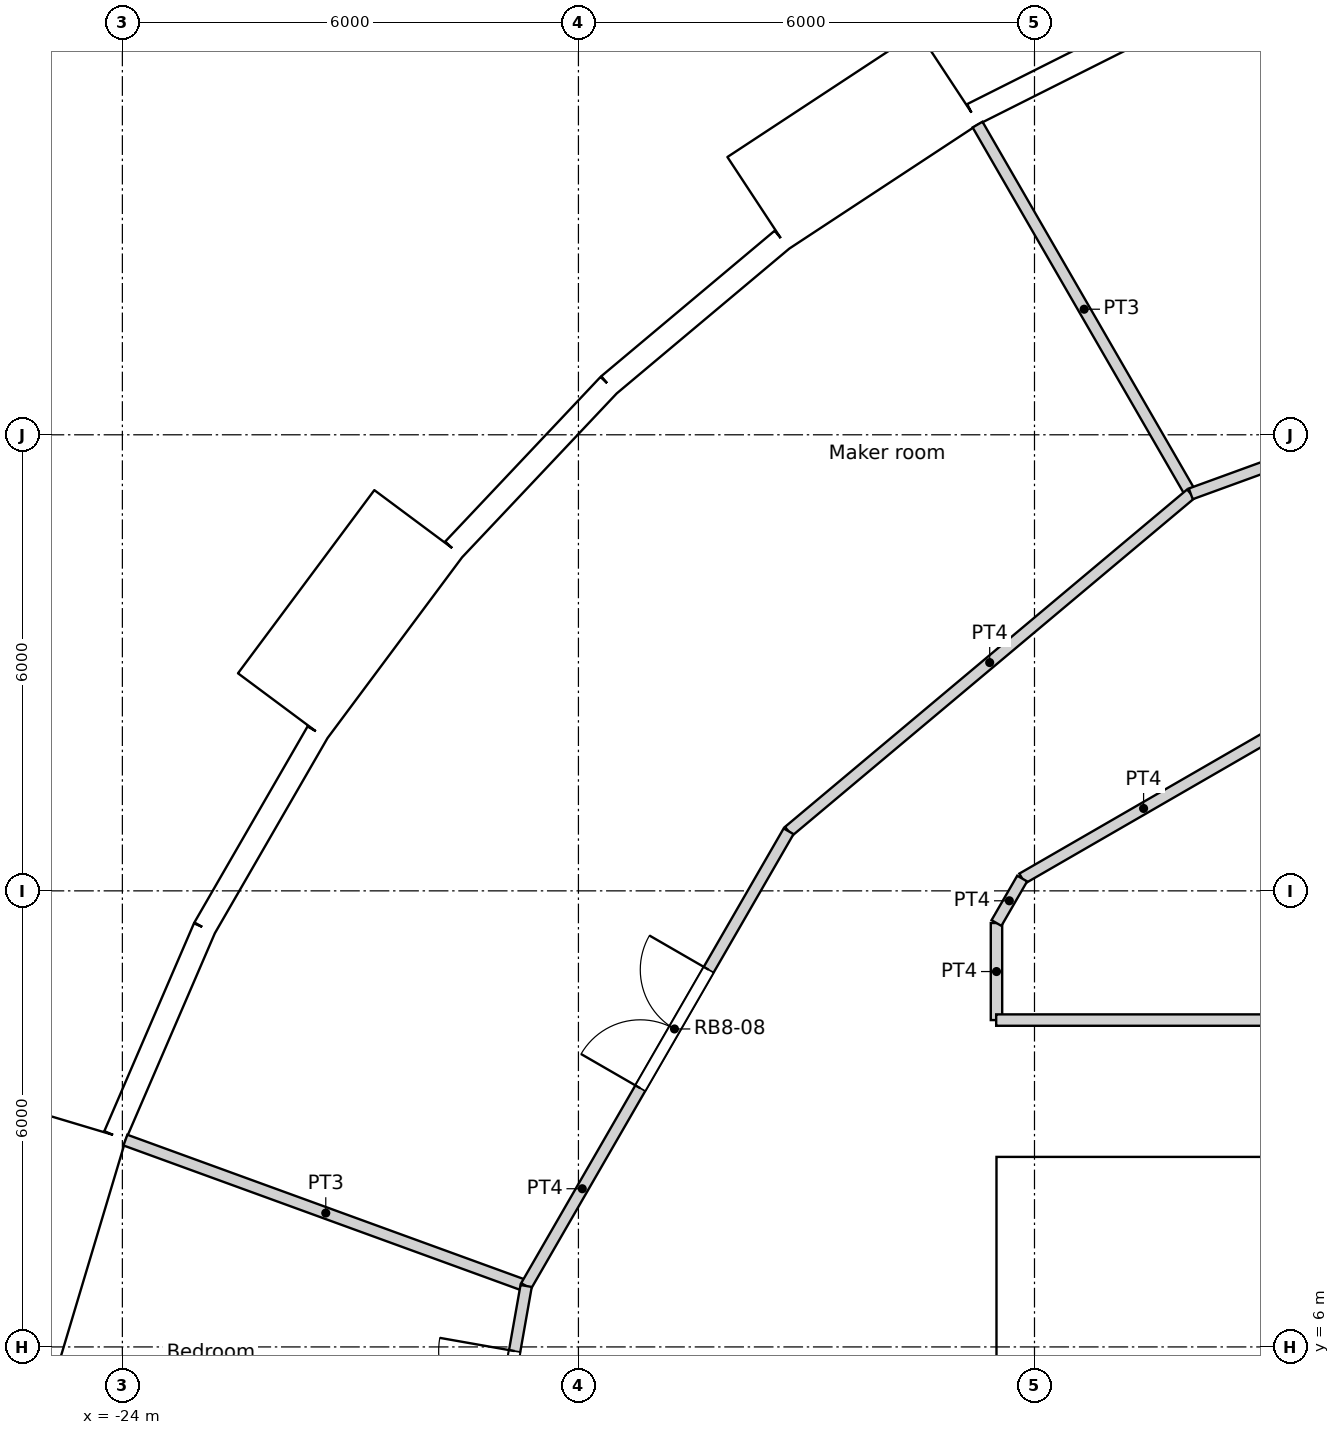
"""IFC4 building model, lengths in metres.
Left out: names, types, materials, properties, quantities, classifications, styles, units other than length and angle.
Written with IfcOpenShell. Run it as: python <this file> out.ifc"""

import sys

from ifc_helpers import new_model, si_unit, direction, frame, frame_2d, origin, origin_2d, place, context, subcontext, project, spatial, rectangle, circle, extrude, element, fill, save


model = new_model("IFC4")
c1 = context("Model", 3, precision=1e-05, world=origin(), true_north=direction((0.0, 1.0)))
c2 = subcontext(c1, "Body", "Model", "MODEL_VIEW")
j1 = project(units=[si_unit("LENGTHUNIT", "METRE"), si_unit("PLANEANGLEUNIT", "RADIAN")], contexts=[c1])
p1 = place(None, origin())
s1 = spatial("IfcSite", under=j1, at=p1, CompositionType="ELEMENT")
p2 = place(p1, origin())
s2 = spatial("IfcBuilding", under=s1, at=p2, CompositionType="ELEMENT")
p3 = place(p2, frame((0.0, 0.0, 201.6)))
s3 = spatial("IfcBuildingStorey", under=s2, at=p3, CompositionType="ELEMENT", Elevation=201.6)
for number, where, z_axis, x_axis in (
    (1, (-12.274, 21.259, 0.0), (0.0, 0.0, 1.0), (1.0, 0.0, 0.0)),
    (2, (-16.846, 17.855, 0.0), (0.0, 0.0, 1.0), (1.0, 0.0, 0.0)),
    (3, (-20.509, 13.489, 0.0), (0.0, 0.0, 1.0), (1.0, 0.0, 0.0)),
    (4, (-23.067, 8.396, 0.0), (0.0, 0.0, 1.0), (1.0, 0.0, 0.0)),
):
    element("IfcColumn", number, at=place(p3, frame(where, z_axis=z_axis, x_axis=x_axis)), inside=s3, PredefinedType="COLUMN", context=c2, shape_type="SweptSolid", body=[
        extrude(circle(Radius=0.6, at=origin_2d()), origin(), (0.0, 0.0, 1.0), 3.6),
    ])
for number, where, z_axis, x_axis in (
    (5, (-9.411, 16.301, 0.0), (0.0, 0.0, 1.0), (1.0, 0.0, 0.0)),
    (6, (-13.798, 12.802, 0.0), (0.0, 0.0, 1.0), (1.0, 0.0, 0.0)),
    (7, (-16.958, 8.167, 0.0), (0.0, 0.0, 1.0), (1.0, 0.0, 0.0)),
):
    element("IfcColumn", number, at=place(p3, frame(where, z_axis=z_axis, x_axis=x_axis)), inside=s3, PredefinedType="COLUMN", context=c2, shape_type="SweptSolid", body=[
        extrude(circle(Radius=0.65, at=origin_2d()), origin(), (0.0, 0.0, 1.0), 3.6),
    ])
p4 = place(p3, frame((-10.158, 23.55, 0.0), z_axis=(0.0, 0.0, 1.0), x_axis=(-0.893637442555, -0.448789618045, 0.0)))
e8 = element("IfcWall", 8, at=p4, inside=s3, PredefinedType="SOLIDWALL", context=c2, shape_type="SweptSolid", body=[
    extrude(rectangle(XDim=2.973, YDim=0.3, at=frame_2d((1.486, 0.0))), origin(), (0.0, 0.0, 1.0), 3.3),
])
p5 = place(p4, frame((1.486, 0.0, 1.55)))
e9 = element("IfcOpeningElement", 9, at=p5, cuts=e8, PredefinedType="OPENING", context=c2, shape_type="SweptSolid", body=[
    extrude(circle(Radius=0.9, at=origin_2d()), frame((0.0, 0.16, 0.0), z_axis=(0.0, -1.0, 0.0), x_axis=(1.0, 0.0, 0.0)), (0.0, 0.0, 1.0), 0.32),
])
p6 = place(p3, frame((-13.132, 22.697, -0.3), z_axis=(0.0, 0.0, 1.0), x_axis=(-0.835514416706, -0.549468524554, 0.0)))
e10 = element("IfcWall", 10, at=p6, inside=s3, PredefinedType="ELEMENTEDWALL", context=c2, shape_type="SweptSolid", body=[
    extrude(rectangle(XDim=3.0, YDim=1.45, at=frame_2d((1.5, 0.0))), origin(), (0.0, 0.0, 1.0), 3.6),
])
p7 = place(p6, frame((1.5, 0.0, 1.85)))
e11 = element("IfcOpeningElement", 11, at=p7, cuts=e10, PredefinedType="OPENING", context=c2, shape_type="SweptSolid", body=[
    extrude(circle(Radius=0.9, at=origin_2d()), frame((0.0, 0.735, 0.0), z_axis=(0.0, -1.0, 0.0), x_axis=(1.0, 0.0, 0.0)), (0.0, 0.0, 1.0), 1.47),
])
p8 = place(p3, frame((-15.323, 20.566, 0.0), z_axis=(0.0, 0.0, 1.0), x_axis=(-0.766049350637, -0.642781761089, 0.0)))
e12 = element("IfcWall", 12, at=p8, inside=s3, PredefinedType="SOLIDWALL", context=c2, shape_type="SweptSolid", body=[
    extrude(rectangle(XDim=2.973, YDim=0.3, at=frame_2d((1.486, 0.0))), origin(), (0.0, 0.0, 1.0), 3.3),
])
p9 = place(p8, frame((1.486, 0.0, 1.55)))
e13 = element("IfcOpeningElement", 13, at=p9, cuts=e12, PredefinedType="OPENING", context=c2, shape_type="SweptSolid", body=[
    extrude(circle(Radius=0.9, at=origin_2d()), frame((0.0, 0.16, 0.0), z_axis=(0.0, -1.0, 0.0), x_axis=(1.0, 0.0, 0.0)), (0.0, 0.0, 1.0), 0.32),
])
p10 = place(p3, frame((-17.6, 18.655, 0.0), z_axis=(0.0, 0.0, 1.0), x_axis=(-0.686235184166, -0.727379730273, 0.0)))
e14 = element("IfcWall", 14, at=p10, inside=s3, PredefinedType="SOLIDWALL", context=c2, shape_type="SweptSolid", body=[
    extrude(rectangle(XDim=2.973, YDim=0.3, at=frame_2d((1.486, 0.0))), origin(), (0.0, 0.0, 1.0), 3.3),
])
p11 = place(p10, frame((1.486, 0.0, 1.55)))
e15 = element("IfcOpeningElement", 15, at=p11, cuts=e14, PredefinedType="OPENING", context=c2, shape_type="SweptSolid", body=[
    extrude(circle(Radius=0.9, at=origin_2d()), frame((0.0, 0.16, 0.0), z_axis=(0.0, -1.0, 0.0), x_axis=(1.0, 0.0, 0.0)), (0.0, 0.0, 1.0), 0.32),
])
p12 = place(p3, frame((-20.103, 16.836, -0.3), z_axis=(0.0, 0.0, 1.0), x_axis=(-0.597183717734, -0.802104486506, 0.0)))
e16 = element("IfcWall", 16, at=p12, inside=s3, PredefinedType="ELEMENTEDWALL", context=c2, shape_type="SweptSolid", body=[
    extrude(rectangle(XDim=3.0, YDim=1.45, at=frame_2d((1.5, 0.0))), origin(), (0.0, 0.0, 1.0), 3.6),
])
p13 = place(p12, frame((1.5, 0.0, 1.85)))
e17 = element("IfcOpeningElement", 17, at=p13, cuts=e16, PredefinedType="OPENING", context=c2, shape_type="SweptSolid", body=[
    extrude(circle(Radius=0.9, at=origin_2d()), frame((0.0, 0.735, 0.0), z_axis=(0.0, -1.0, 0.0), x_axis=(1.0, 0.0, 0.0)), (0.0, 0.0, 1.0), 1.47),
])
p14 = place(p3, frame((-21.433, 14.085, 0.0), z_axis=(0.0, 0.0, 1.0), x_axis=(-0.500016263033, -0.866016014115, 0.0)))
e18 = element("IfcWall", 18, at=p14, inside=s3, PredefinedType="SOLIDWALL", context=c2, shape_type="SweptSolid", body=[
    extrude(rectangle(XDim=2.973, YDim=0.3, at=frame_2d((1.487, 0.0))), origin(), (0.0, 0.0, 1.0), 3.3),
])
p15 = place(p14, frame((1.486, 0.0, 1.55)))
e19 = element("IfcOpeningElement", 19, at=p15, cuts=e18, PredefinedType="OPENING", context=c2, shape_type="SweptSolid", body=[
    extrude(circle(Radius=0.9, at=origin_2d()), frame((0.0, 0.16, 0.0), z_axis=(0.0, -1.0, 0.0), x_axis=(1.0, 0.0, 0.0)), (0.0, 0.0, 1.0), 0.32),
])
p16 = place(p3, frame((-22.919, 11.51, 0.0), z_axis=(0.0, 0.0, 1.0), x_axis=(-0.396078892785, -0.918216483565, 0.0)))
e20 = element("IfcWall", 20, at=p16, inside=s3, PredefinedType="SOLIDWALL", context=c2, shape_type="SweptSolid", body=[
    extrude(rectangle(XDim=2.973, YDim=0.3, at=frame_2d((1.486, 0.0))), origin(), (0.0, 0.0, 1.0), 3.3),
])
p17 = place(p16, frame((1.486, 0.0, 1.55)))
e21 = element("IfcOpeningElement", 21, at=p17, cuts=e20, PredefinedType="OPENING", context=c2, shape_type="SweptSolid", body=[
    extrude(circle(Radius=0.9, at=origin_2d()), frame((0.0, 0.16, 0.0), z_axis=(0.0, -1.0, 0.0), x_axis=(1.0, 0.0, 0.0)), (0.0, 0.0, 1.0), 0.32),
])
p18 = place(p3, frame((-24.649, 8.945, -0.3), z_axis=(0.0, 0.0, 1.0), x_axis=(-0.286780420304, -0.957996341606, 0.0)))
e22 = element("IfcWall", 22, at=p18, inside=s3, PredefinedType="ELEMENTEDWALL", context=c2, shape_type="SweptSolid", body=[
    extrude(rectangle(XDim=3.0, YDim=1.45, at=frame_2d((1.5, 0.0))), origin(), (0.0, 0.0, 1.0), 3.6),
])
p19 = place(p18, frame((1.5, 0.0, 1.85)))
e23 = element("IfcOpeningElement", 23, at=p19, cuts=e22, PredefinedType="OPENING", context=c2, shape_type="SweptSolid", body=[
    extrude(circle(Radius=0.9, at=origin_2d()), frame((0.0, 0.735, 0.0), z_axis=(0.0, -1.0, 0.0), x_axis=(1.0, 0.0, 0.0)), (0.0, 0.0, 1.0), 1.47),
])
p20 = place(p3, frame((-24.958, 5.905, 0.0), z_axis=(0.0, 0.0, 1.0), x_axis=(-0.173686952598, -0.984800915159, 0.0)))
e24 = element("IfcWall", 24, at=p20, inside=s3, PredefinedType="SOLIDWALL", context=c2, shape_type="SweptSolid", body=[
    extrude(rectangle(XDim=2.973, YDim=0.3, at=frame_2d((1.486, 0.0))), origin(), (0.0, 0.0, 1.0), 3.3),
])
p21 = place(p20, frame((1.486, 0.0, 1.55)))
e25 = element("IfcOpeningElement", 25, at=p21, cuts=e24, PredefinedType="OPENING", context=c2, shape_type="SweptSolid", body=[
    extrude(circle(Radius=0.9, at=origin_2d()), frame((0.0, 0.16, 0.0), z_axis=(0.0, -1.0, 0.0), x_axis=(1.0, 0.0, 0.0)), (0.0, 0.0, 1.0), 0.32),
])
p22 = place(p3, frame((-12.5, 8.05, 0.0), z_axis=(0.0, 0.0, 1.0), x_axis=(1.0, 0.0, 0.0)))
e26 = element("IfcWall", 26, at=p22, inside=s3, PredefinedType="SOLIDWALL", context=c2, shape_type="SweptSolid", body=[
    extrude(rectangle(XDim=25.0, YDim=0.9, at=frame_2d((12.5, 0.0))), origin(), (0.0, 0.0, 1.0), 3.6),
])
p23 = place(p22, frame((8.3, 0.0, 0.0)))
e27 = element("IfcOpeningElement", 27, at=p23, cuts=e26, PredefinedType="OPENING", context=c2, shape_type="SweptSolid", body=[
    extrude(rectangle(XDim=1.8, YDim=2.1, at=frame_2d((0.9, 1.05))), frame((0.0, 0.45, 0.0), z_axis=(0.0, -1.0, 0.0), x_axis=(1.0, 0.0, 0.0)), (0.0, 0.0, 1.0), 0.9),
])
p24 = place(p3, frame((-12.05, -7.6, 0.0), z_axis=(0.0, 0.0, 1.0), x_axis=(0.0, 1.0, 0.0)))
e28 = element("IfcWall", 28, at=p24, inside=s3, PredefinedType="SOLIDWALL", context=c2, shape_type="SweptSolid", body=[
    extrude(rectangle(XDim=15.2, YDim=0.9, at=frame_2d((7.6, 0.0))), origin(), (0.0, 0.0, 1.0), 3.6),
])
p25 = place(p24, frame((7.1, 0.0, 0.0)))
e29 = element("IfcOpeningElement", 29, at=p25, cuts=e28, PredefinedType="OPENING", context=c2, shape_type="SweptSolid", body=[
    extrude(rectangle(XDim=1.0, YDim=2.1, at=frame_2d((0.5, 1.05))), frame((0.0, 0.45, 0.0), z_axis=(0.0, -1.0, 0.0), x_axis=(1.0, 0.0, 0.0)), (0.0, 0.0, 1.0), 0.9),
])
p26 = place(p3, frame((-9.05, -7.0, 0.0), z_axis=(0.0, 0.0, 1.0), x_axis=(0.0, 1.0, 0.0)))
e30 = element("IfcWall", 30, at=p26, inside=s3, PredefinedType="SOLIDWALL", context=c2, shape_type="SweptSolid", body=[
    extrude(rectangle(XDim=14.6, YDim=0.3, at=frame_2d((7.3, 0.0))), origin(), (0.0, 0.0, 1.0), 3.3),
])
p27 = place(p3, frame((-12.504, 10.3, 0.0), z_axis=(0.0, 0.0, 1.0), x_axis=(1.0, 0.0, 0.0)))
e31 = element("IfcWall", 31, at=p27, inside=s3, PredefinedType="PARTITIONING", context=c2, shape_type="SweptSolid", body=[
    extrude(rectangle(XDim=7.687, YDim=0.15, at=frame_2d((3.844, 0.0))), origin(), (0.0, 0.0, 1.0), 3.3),
])
p28 = place(p3, frame((-12.162, 12.162, 0.0), z_axis=(0.0, 0.0, 1.0), x_axis=(0.866004766557, 0.500035743023, 0.0)))
e32 = element("IfcWall", 32, at=p28, inside=s3, PredefinedType="PARTITIONING", context=c2, shape_type="SweptSolid", body=[
    extrude(rectangle(XDim=8.477, YDim=0.15, at=frame_2d((4.239, 0.0))), origin(), (0.0, 0.0, 1.0), 3.3),
])
p29 = place(p28, frame((3.739, 0.0, 0.0)))
e33 = element("IfcOpeningElement", 33, at=p29, cuts=e32, PredefinedType="OPENING", context=c2, shape_type="SweptSolid", body=[
    extrude(rectangle(XDim=1.0, YDim=2.04, at=frame_2d((0.5, 1.02))), frame((0.0, 0.075, 0.0), z_axis=(0.0, -1.0, 0.0), x_axis=(1.0, 0.0, 0.0)), (0.0, 0.0, 1.0), 0.15),
])
p30 = place(p3, frame((-9.944, 17.223, 0.0), z_axis=(0.0, 0.0, 1.0), x_axis=(0.939672634566, 0.342075050021, 0.0)))
e34 = element("IfcWall", 34, at=p30, inside=s3, PredefinedType="PARTITIONING", context=c2, shape_type="SweptSolid", body=[
    extrude(rectangle(XDim=6.908, YDim=0.15, at=frame_2d((3.454, 0.0))), origin(), (0.0, 0.0, 1.0), 3.3),
])
p31 = place(p30, frame((2.554, 0.0, 0.0)))
e35 = element("IfcOpeningElement", 35, at=p31, cuts=e34, PredefinedType="OPENING", context=c2, shape_type="SweptSolid", body=[
    extrude(rectangle(XDim=1.8, YDim=2.1, at=frame_2d((0.9, 1.05))), frame((0.0, 0.075, 0.0), z_axis=(0.0, -1.0, 0.0), x_axis=(1.0, 0.0, 0.0)), (0.0, 0.0, 1.0), 0.15),
])
p32 = place(p3, frame((-15.235, 12.784, 0.0), z_axis=(0.0, 0.0, 1.0), x_axis=(0.766064078986, 0.642764207845, 0.0)))
e36 = element("IfcWall", 36, at=p32, inside=s3, PredefinedType="PARTITIONING", context=c2, shape_type="SweptSolid", body=[
    extrude(rectangle(XDim=6.906, YDim=0.15, at=frame_2d((3.453, 0.0))), origin(), (0.0, 0.0, 1.0), 3.3),
])
p33 = place(p3, frame((-12.5, 11.577, 0.0), z_axis=(0.0, 0.0, 1.0), x_axis=(0.500024767483, 0.866011103799, 0.0)))
e37 = element("IfcWall", 37, at=p33, inside=s3, PredefinedType="PARTITIONING", context=c2, shape_type="SweptSolid", body=[
    extrude(rectangle(XDim=0.676, YDim=0.15, at=frame_2d((0.338, 0.0))), origin(), (0.0, 0.0, 1.0), 3.3),
])
p34 = place(p3, frame((-12.5, 10.3, 0.0), z_axis=(0.0, 0.0, 1.0), x_axis=(0.0, 1.0, 0.0)))
e38 = element("IfcWall", 38, at=p34, inside=s3, PredefinedType="PARTITIONING", context=c2, shape_type="SweptSolid", body=[
    extrude(rectangle(XDim=1.277, YDim=0.15, at=frame_2d((0.638, 0.0))), origin(), (0.0, 0.0, 1.0), 3.3),
])
p35 = place(p3, frame((-18.688, 6.802, 0.0), z_axis=(0.0, 0.0, 1.0), x_axis=(0.499914202267, 0.866074933462, 0.0)))
e39 = element("IfcWall", 39, at=p35, inside=s3, PredefinedType="PARTITIONING", context=c2, shape_type="SweptSolid", body=[
    extrude(rectangle(XDim=6.907, YDim=0.15, at=frame_2d((3.454, 0.0))), origin(), (0.0, 0.0, 1.0), 3.3),
])
p36 = place(p35, frame((3.004, 0.0, 0.0)))
e40 = element("IfcOpeningElement", 40, at=p36, cuts=e39, PredefinedType="OPENING", context=c2, shape_type="SweptSolid", body=[
    extrude(rectangle(XDim=1.8, YDim=2.1, at=frame_2d((0.9, 1.05))), frame((0.0, 0.075, 0.0), z_axis=(0.0, -1.0, 0.0), x_axis=(1.0, 0.0, 0.0)), (0.0, 0.0, 1.0), 0.15),
])
p37 = place(p3, frame((-19.888, 0.0, 0.0), z_axis=(0.0, 0.0, 1.0), x_axis=(0.173763153374, 0.984787472772, 0.0)))
e41 = element("IfcWall", 41, at=p37, inside=s3, PredefinedType="PARTITIONING", context=c2, shape_type="SweptSolid", body=[
    extrude(rectangle(XDim=6.907, YDim=0.15, at=frame_2d((3.454, 0.0))), origin(), (0.0, 0.0, 1.0), 3.3),
])
p38 = place(p37, frame((5.037, 0.0, 0.0)))
e42 = element("IfcOpeningElement", 42, at=p38, cuts=e41, PredefinedType="OPENING", context=c2, shape_type="SweptSolid", body=[
    extrude(rectangle(XDim=1.0, YDim=2.1, at=frame_2d((0.5, 1.05))), frame((0.0, 0.075, 0.0), z_axis=(0.0, -1.0, 0.0), x_axis=(1.0, 0.0, 0.0)), (0.0, 0.0, 1.0), 0.15),
])
p39 = place(p37, frame((0.659, 0.0, 0.0)))
e43 = element("IfcOpeningElement", 43, at=p39, cuts=e41, PredefinedType="OPENING", context=c2, shape_type="SweptSolid", body=[
    extrude(rectangle(XDim=1.0, YDim=2.1, at=frame_2d((0.5, 1.05))), frame((0.0, 0.075, 0.0), z_axis=(0.0, -1.0, 0.0), x_axis=(1.0, 0.0, 0.0)), (0.0, 0.0, 1.0), 0.15),
])
p40 = place(p3, frame((-12.749, 22.081, 0.0), z_axis=(0.0, 0.0, 1.0), x_axis=(0.500010020406, -0.866019618423, 0.0)))
e44 = element("IfcWall", 44, at=p40, inside=s3, PredefinedType="PARTITIONING", context=c2, shape_type="SweptSolid", body=[
    extrude(rectangle(XDim=5.61, YDim=0.15, at=frame_2d((2.805, 0.0))), origin(), (0.0, 0.0, 1.0), 3.3),
])
p41 = place(p3, frame((-23.96, 8.721, 0.0), z_axis=(0.0, 0.0, 1.0), x_axis=(0.939686652043, -0.342036541866, 0.0)))
e45 = element("IfcWall", 45, at=p41, inside=s3, PredefinedType="PARTITIONING", context=c2, shape_type="SweptSolid", body=[
    extrude(rectangle(XDim=5.61, YDim=0.15, at=frame_2d((2.805, 0.0))), origin(), (0.0, 0.0, 1.0), 3.3),
])
p42 = place(p5, origin())
e46 = element("IfcWindow", 46, at=p42, inside=s3, PartitioningType="SINGLE_PANEL", PredefinedType="WINDOW", context=c2, shape_type="SweptSolid", body=[
    extrude(circle(Radius=0.9, at=origin_2d()), frame((0.0, 0.12, 0.0), z_axis=(0.0, -1.0, 0.0), x_axis=(1.0, 0.0, 0.0)), (0.0, 0.0, 1.0), 0.1),
])
fill(e9, e46)
p43 = place(p7, origin())
e47 = element("IfcWindow", 47, at=p43, inside=s3, PartitioningType="SINGLE_PANEL", PredefinedType="WINDOW", context=c2, shape_type="SweptSolid", body=[
    extrude(circle(Radius=0.9, at=origin_2d()), frame((0.0, 0.695, 0.0), z_axis=(0.0, -1.0, 0.0), x_axis=(1.0, 0.0, 0.0)), (0.0, 0.0, 1.0), 0.1),
])
fill(e11, e47)
p44 = place(p9, origin())
e48 = element("IfcWindow", 48, at=p44, inside=s3, PartitioningType="SINGLE_PANEL", PredefinedType="WINDOW", context=c2, shape_type="SweptSolid", body=[
    extrude(circle(Radius=0.9, at=origin_2d()), frame((0.0, 0.12, 0.0), z_axis=(0.0, -1.0, 0.0), x_axis=(1.0, 0.0, 0.0)), (0.0, 0.0, 1.0), 0.1),
])
fill(e13, e48)
p45 = place(p11, origin())
e49 = element("IfcWindow", 49, at=p45, inside=s3, PartitioningType="SINGLE_PANEL", PredefinedType="WINDOW", context=c2, shape_type="SweptSolid", body=[
    extrude(circle(Radius=0.9, at=origin_2d()), frame((0.0, 0.12, 0.0), z_axis=(0.0, -1.0, 0.0), x_axis=(1.0, 0.0, 0.0)), (0.0, 0.0, 1.0), 0.1),
])
fill(e15, e49)
p46 = place(p13, origin())
e50 = element("IfcWindow", 50, at=p46, inside=s3, PartitioningType="SINGLE_PANEL", PredefinedType="WINDOW", context=c2, shape_type="SweptSolid", body=[
    extrude(circle(Radius=0.9, at=origin_2d()), frame((0.0, 0.695, 0.0), z_axis=(0.0, -1.0, 0.0), x_axis=(1.0, 0.0, 0.0)), (0.0, 0.0, 1.0), 0.1),
])
fill(e17, e50)
p47 = place(p15, origin())
e51 = element("IfcWindow", 51, at=p47, inside=s3, PartitioningType="SINGLE_PANEL", PredefinedType="WINDOW", context=c2, shape_type="SweptSolid", body=[
    extrude(circle(Radius=0.9, at=origin_2d()), frame((0.0, 0.12, 0.0), z_axis=(0.0, -1.0, 0.0), x_axis=(1.0, 0.0, 0.0)), (0.0, 0.0, 1.0), 0.1),
])
fill(e19, e51)
p48 = place(p17, origin())
e52 = element("IfcWindow", 52, at=p48, inside=s3, PartitioningType="SINGLE_PANEL", PredefinedType="WINDOW", context=c2, shape_type="SweptSolid", body=[
    extrude(circle(Radius=0.9, at=origin_2d()), frame((0.0, 0.12, 0.0), z_axis=(0.0, -1.0, 0.0), x_axis=(1.0, 0.0, 0.0)), (0.0, 0.0, 1.0), 0.1),
])
fill(e21, e52)
p49 = place(p19, origin())
e53 = element("IfcWindow", 53, at=p49, inside=s3, PartitioningType="SINGLE_PANEL", PredefinedType="WINDOW", context=c2, shape_type="SweptSolid", body=[
    extrude(circle(Radius=0.9, at=origin_2d()), frame((0.0, 0.695, 0.0), z_axis=(0.0, -1.0, 0.0), x_axis=(1.0, 0.0, 0.0)), (0.0, 0.0, 1.0), 0.1),
])
fill(e23, e53)
p50 = place(p36, origin())
e54 = element("IfcDoor", 54, at=p50, inside=s3, OperationType="DOUBLE_DOOR_SINGLE_SWING", PredefinedType="DOOR", context=c2, shape_type="SweptSolid", body=[
    extrude(rectangle(XDim=1.8, YDim=2.1, at=frame_2d((0.9, 1.05))), frame((0.0, 0.025, 0.0), z_axis=(0.0, -1.0, 0.0), x_axis=(1.0, 0.0, 0.0)), (0.0, 0.0, 1.0), 0.05),
])
fill(e40, e54)
p51 = place(p38, origin())
e55 = element("IfcDoor", 55, at=p51, inside=s3, OperationType="SINGLE_SWING_RIGHT", PredefinedType="DOOR", context=c2, shape_type="SweptSolid", body=[
    extrude(rectangle(XDim=1.0, YDim=2.1, at=frame_2d((0.5, 1.05))), frame((0.0, 0.025, 0.0), z_axis=(0.0, -1.0, 0.0), x_axis=(1.0, 0.0, 0.0)), (0.0, 0.0, 1.0), 0.05),
])
fill(e42, e55)
save(model, sys.argv[1])
